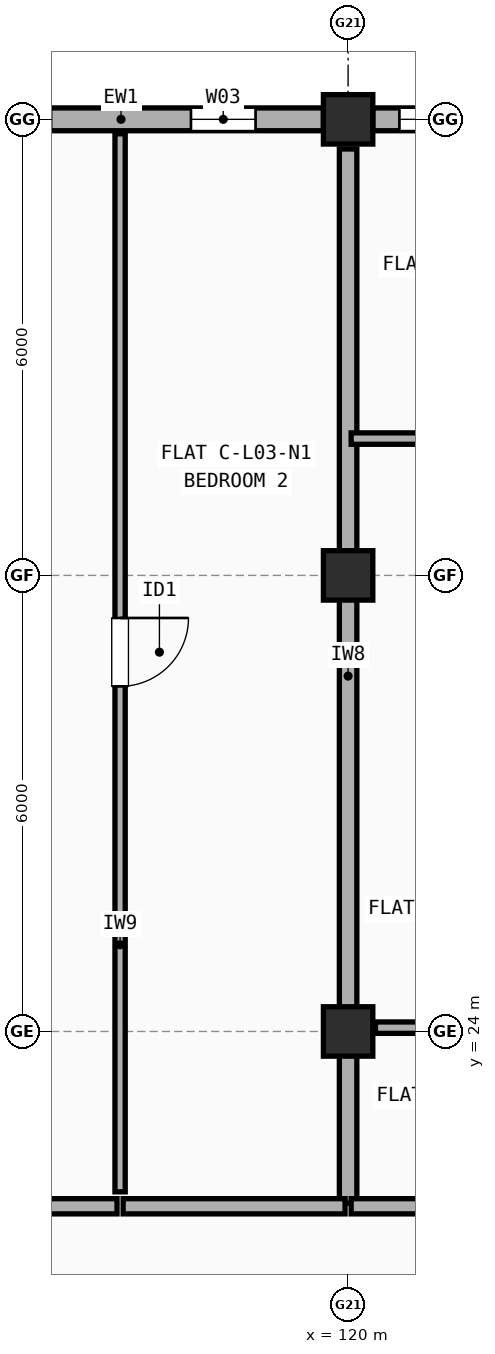
"""IFC4 building model, lengths in metres.
Left out: names, types, materials, properties, quantities, classifications, styles, units other than length and angle.
Written with IfcOpenShell. Run it as: python <this file> out.ifc"""

import sys

from ifc_helpers import new_model, si_unit, direction, frame, frame_2d, origin, origin_2d, place, context, subcontext, project, spatial, rectangle, extrude, element, fill, save


model = new_model("IFC4")
c1 = context("Model", 3, precision=1e-05, world=origin(), true_north=direction((0.0, 1.0)))
c2 = subcontext(c1, "Body", "Model", "MODEL_VIEW")
j1 = project(units=[si_unit("LENGTHUNIT", "METRE"), si_unit("PLANEANGLEUNIT", "RADIAN")], contexts=[c1])
p1 = place(None, origin())
s1 = spatial("IfcSite", under=j1, at=p1, CompositionType="ELEMENT")
p2 = place(p1, origin())
s2 = spatial("IfcBuilding", under=s1, at=p2, CompositionType="ELEMENT")
p3 = place(p2, frame((0.0, 0.0, 10.9)))
s3 = spatial("IfcBuildingStorey", under=s2, at=p3, CompositionType="ELEMENT", Elevation=10.9)
for number, where, z_axis, x_axis in (
    (1, (120.0, 24.0, 0.0), (0.0, 0.0, 1.0), (1.0, 0.0, 0.0)),
    (2, (120.0, 30.0, 0.0), (0.0, 0.0, 1.0), (1.0, 0.0, 0.0)),
    (3, (120.0, 36.0, 0.0), (0.0, 0.0, 1.0), (1.0, 0.0, 0.0)),
):
    element("IfcColumn", number, at=place(p3, frame(where, z_axis=z_axis, x_axis=x_axis)), inside=s3, PredefinedType="COLUMN", context=c2, shape_type="SweptSolid", body=[
        extrude(rectangle(XDim=0.65, YDim=0.65, at=origin_2d()), origin(), (0.0, 0.0, 1.0), 2.96),
    ])
p4 = place(p3, frame((125.675, 36.0, 0.0), z_axis=(0.0, 0.0, 1.0), x_axis=(-1.0, 0.0, 0.0)))
e4 = element("IfcWall", 4, at=p4, inside=s3, PredefinedType="STANDARD", context=c2, shape_type="SweptSolid", body=[
    extrude(rectangle(XDim=5.35, YDim=0.3, at=frame_2d((2.675, 0.0))), origin(), (0.0, 0.0, 1.0), 2.442),
])
p5 = place(p4, frame((1.565, 0.0, 0.9)))
e5 = element("IfcOpeningElement", 5, at=p5, cuts=e4, PredefinedType="OPENING", context=c2, shape_type="SweptSolid", body=[
    extrude(rectangle(XDim=1.2, YDim=1.35, at=frame_2d((0.6, 0.675))), frame((0.0, 0.16, 0.0), z_axis=(0.0, -1.0, 0.0), x_axis=(1.0, 0.0, 0.0)), (0.0, 0.0, 1.0), 0.32),
])
p6 = place(p4, frame((3.8, 0.0, 0.9)))
e6 = element("IfcOpeningElement", 6, at=p6, cuts=e4, PredefinedType="OPENING", context=c2, shape_type="SweptSolid", body=[
    extrude(rectangle(XDim=1.2, YDim=1.35, at=frame_2d((0.6, 0.675))), frame((0.0, 0.16, 0.0), z_axis=(0.0, -1.0, 0.0), x_axis=(1.0, 0.0, 0.0)), (0.0, 0.0, 1.0), 0.32),
])
p7 = place(p3, frame((119.675, 36.0, 0.0), z_axis=(0.0, 0.0, 1.0), x_axis=(-1.0, 0.0, 0.0)))
e7 = element("IfcWall", 7, at=p7, inside=s3, PredefinedType="STANDARD", context=c2, shape_type="SweptSolid", body=[
    extrude(rectangle(XDim=5.35, YDim=0.3, at=frame_2d((2.675, 0.0))), origin(), (0.0, 0.0, 1.0), 2.442),
])
p8 = place(p7, frame((0.893, 0.0, 0.9)))
e8 = element("IfcOpeningElement", 8, at=p8, cuts=e7, PredefinedType="OPENING", context=c2, shape_type="SweptSolid", body=[
    extrude(rectangle(XDim=0.85, YDim=1.25, at=frame_2d((0.425, 0.625))), frame((0.0, 0.16, 0.0), z_axis=(0.0, -1.0, 0.0), x_axis=(1.0, 0.0, 0.0)), (0.0, 0.0, 1.0), 0.32),
])
p9 = place(p7, frame((3.583, 0.0, 0.9)))
e9 = element("IfcOpeningElement", 9, at=p9, cuts=e7, PredefinedType="OPENING", context=c2, shape_type="SweptSolid", body=[
    extrude(rectangle(XDim=0.9, YDim=1.3, at=frame_2d((0.45, 0.65))), frame((0.0, 0.16, 0.0), z_axis=(0.0, -1.0, 0.0), x_axis=(1.0, 0.0, 0.0)), (0.0, 0.0, 1.0), 0.32),
])
p10 = place(p3, frame((120.0, 21.74, 0.0), z_axis=(0.0, 0.0, 1.0), x_axis=(0.0, 1.0, 0.0)))
e10 = element("IfcWall", 10, at=p10, inside=s3, PredefinedType="SOLIDWALL", context=c2, shape_type="SweptSolid", body=[
    extrude(rectangle(XDim=13.87, YDim=0.23, at=frame_2d((6.935, 0.0))), origin(), (0.0, 0.0, 1.0), 2.508),
])
p11 = place(p3, frame((106.54, 21.7, 0.0), z_axis=(0.0, 0.0, 1.0), x_axis=(1.0, 0.0, 0.0)))
e11 = element("IfcWall", 11, at=p11, inside=s3, PredefinedType="SOLIDWALL", context=c2, shape_type="SweptSolid", body=[
    extrude(rectangle(XDim=10.42, YDim=0.2, at=frame_2d((5.21, 0.0))), origin(), (0.0, 0.0, 1.0), 2.508),
])
p12 = place(p11, frame((4.685, 0.0, 0.0)))
e12 = element("IfcOpeningElement", 12, at=p12, cuts=e11, PredefinedType="OPENING", context=c2, shape_type="SweptSolid", body=[
    extrude(rectangle(XDim=1.05, YDim=2.15, at=frame_2d((0.525, 1.075))), frame((0.0, 0.11, 0.0), z_axis=(0.0, -1.0, 0.0), x_axis=(1.0, 0.0, 0.0)), (0.0, 0.0, 1.0), 0.22),
])
p13 = place(p3, frame((117.04, 21.7, 0.0), z_axis=(0.0, 0.0, 1.0), x_axis=(1.0, 0.0, 0.0)))
e13 = element("IfcWall", 13, at=p13, inside=s3, PredefinedType="SOLIDWALL", context=c2, shape_type="SweptSolid", body=[
    extrude(rectangle(XDim=2.92, YDim=0.2, at=frame_2d((1.46, 0.0))), origin(), (0.0, 0.0, 1.0), 2.96),
])
p14 = place(p3, frame((117.0, 21.89, 0.0), z_axis=(0.0, 0.0, 1.0), x_axis=(0.0, 1.0, 0.0)))
e14 = element("IfcWall", 14, at=p14, inside=s3, PredefinedType="PARTITIONING", context=c2, shape_type="SweptSolid", body=[
    extrude(rectangle(XDim=13.92, YDim=0.135, at=frame_2d((6.96, 0.0))), origin(), (0.0, 0.0, 1.0), 2.442),
])
p15 = place(p14, frame((6.65, 0.0, 0.0)))
e15 = element("IfcOpeningElement", 15, at=p15, cuts=e14, PredefinedType="OPENING", context=c2, shape_type="SweptSolid", body=[
    extrude(rectangle(XDim=0.9, YDim=2.1, at=frame_2d((0.45, 1.05))), frame((0.0, 0.077, 0.0), z_axis=(0.0, -1.0, 0.0), x_axis=(1.0, 0.0, 0.0)), (0.0, 0.0, 1.0), 0.155),
])
p16 = place(p3, frame((120.04, 21.7, 0.0), z_axis=(0.0, 0.0, 1.0), x_axis=(1.0, 0.0, 0.0)))
e16 = element("IfcWall", 16, at=p16, inside=s3, PredefinedType="SOLIDWALL", context=c2, shape_type="SweptSolid", body=[
    extrude(rectangle(XDim=4.42, YDim=0.2, at=frame_2d((2.21, 0.0))), origin(), (0.0, 0.0, 1.0), 2.96),
])
p17 = place(p3, frame((120.04, 31.8, 0.0), z_axis=(0.0, 0.0, 1.0), x_axis=(1.0, 0.0, 0.0)))
e17 = element("IfcWall", 17, at=p17, inside=s3, PredefinedType="PARTITIONING", context=c2, shape_type="SweptSolid", body=[
    extrude(rectangle(XDim=4.42, YDim=0.15, at=frame_2d((2.21, 0.0))), origin(), (0.0, 0.0, 1.0), 2.508),
])
p18 = place(p3, frame((120.36, 24.05, 0.0), z_axis=(0.0, 0.0, 1.0), x_axis=(1.0, 0.0, 0.0)))
e18 = element("IfcWall", 18, at=p18, inside=s3, PredefinedType="PARTITIONING", context=c2, shape_type="SweptSolid", body=[
    extrude(rectangle(XDim=4.1, YDim=0.15, at=frame_2d((2.05, 0.0))), origin(), (0.0, 0.0, 1.0), 2.508),
])
p19 = place(p6, origin())
e19 = element("IfcWindow", 19, at=p19, inside=s3, PartitioningType="SINGLE_PANEL", PredefinedType="WINDOW", context=c2, shape_type="SweptSolid", body=[
    extrude(rectangle(XDim=1.2, YDim=1.35, at=frame_2d((0.6, 0.675))), frame((0.0, 0.03, 0.0), z_axis=(0.0, -1.0, 0.0), x_axis=(1.0, 0.0, 0.0)), (0.0, 0.0, 1.0), 0.06),
])
fill(e6, e19)
p20 = place(p8, origin())
e20 = element("IfcWindow", 20, at=p20, inside=s3, PartitioningType="SINGLE_PANEL", PredefinedType="WINDOW", context=c2, shape_type="SweptSolid", body=[
    extrude(rectangle(XDim=0.85, YDim=1.25, at=frame_2d((0.425, 0.625))), frame((0.0, 0.03, 0.0), z_axis=(0.0, -1.0, 0.0), x_axis=(1.0, 0.0, 0.0)), (0.0, 0.0, 1.0), 0.06),
])
fill(e8, e20)
p21 = place(p15, origin())
e21 = element("IfcDoor", 21, at=p21, inside=s3, OperationType="SINGLE_SWING_RIGHT", PredefinedType="DOOR", context=c2, shape_type="SweptSolid", body=[
    extrude(rectangle(XDim=0.9, YDim=2.1, at=frame_2d((0.45, 1.05))), frame((0.0, 0.025, 0.0), z_axis=(0.0, -1.0, 0.0), x_axis=(1.0, 0.0, 0.0)), (0.0, 0.0, 1.0), 0.05),
])
fill(e15, e21)
save(model, sys.argv[1])
